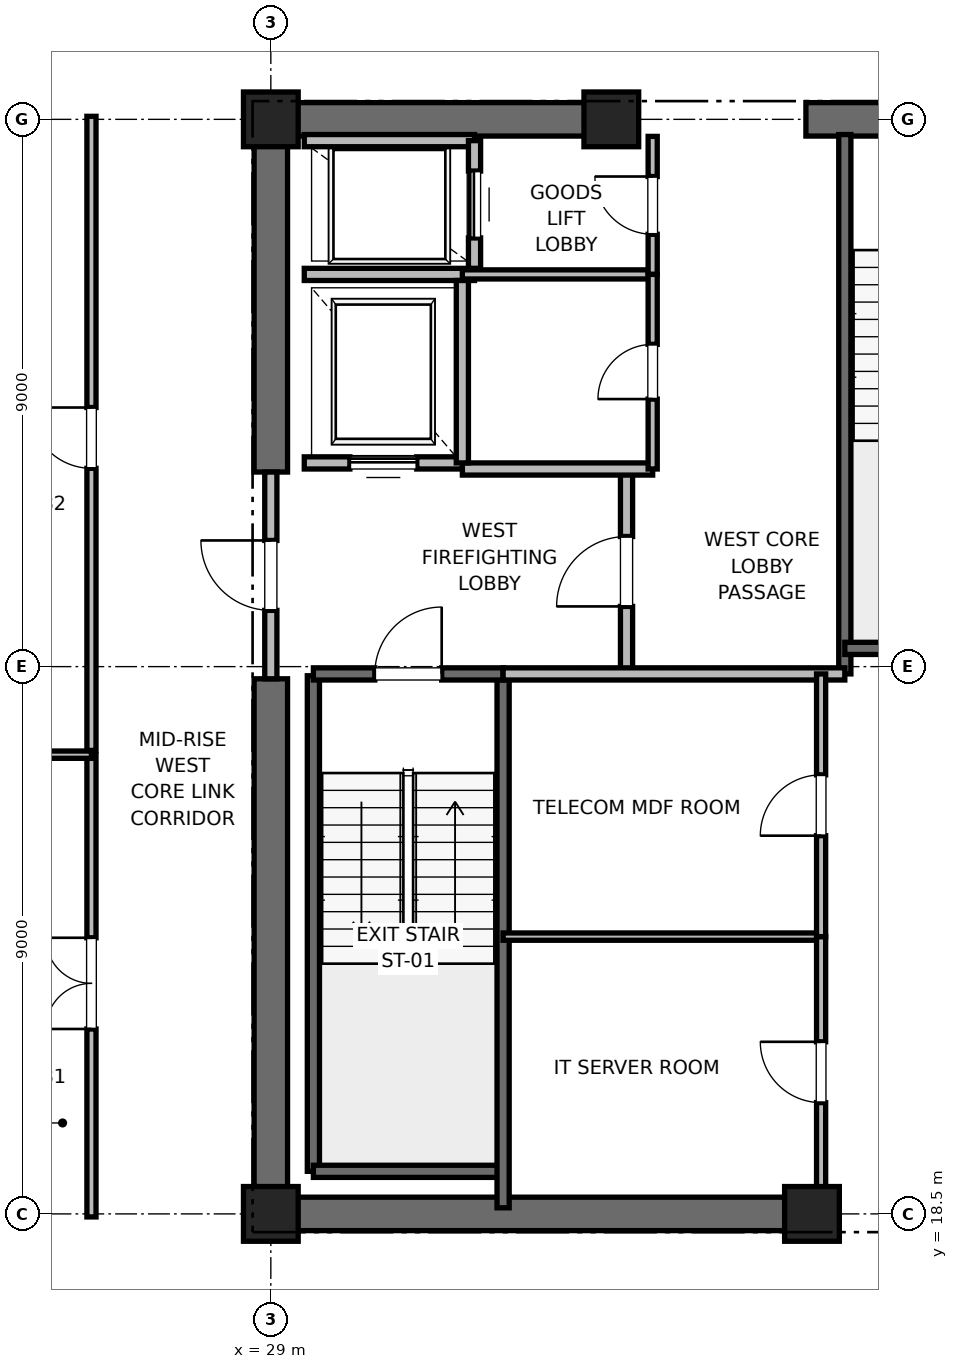
"""IFC4 building model, lengths in metres.
Left out: names, types, materials, properties, quantities, classifications, styles, units other than length and angle.
Written with IfcOpenShell. Run it as: python <this file> out.ifc"""

import sys

from ifc_helpers import new_model, si_unit, direction, frame, frame_2d, origin, origin_2d, place, context, subcontext, project, spatial, rectangle, extrude, element, fill, save


model = new_model("IFC4")
c1 = context("Model", 3, precision=1e-05, world=origin(), true_north=direction((0.0, 1.0)))
c2 = subcontext(c1, "Body", "Model", "MODEL_VIEW")
j1 = project(units=[si_unit("LENGTHUNIT", "METRE"), si_unit("PLANEANGLEUNIT", "RADIAN")], contexts=[c1])
p1 = place(None, origin())
s1 = spatial("IfcSite", under=j1, at=p1, CompositionType="ELEMENT")
p2 = place(p1, origin())
s2 = spatial("IfcBuilding", under=s1, at=p2, CompositionType="ELEMENT")
p3 = place(p2, frame((0.0, 0.0, 217.2)))
s3 = spatial("IfcBuildingStorey", under=s2, at=p3, CompositionType="ELEMENT", Elevation=217.2)
for number, where, z_axis, x_axis in (
    (1, (29.0, 18.5, 0.0), (0.0, 0.0, 1.0), (1.0, 0.0, 0.0)),
    (2, (29.0, 36.5, 0.0), (0.0, 0.0, 1.0), (1.0, 0.0, 0.0)),
    (3, (37.9, 18.5, 0.0), (0.0, 0.0, 1.0), (1.0, 0.0, 0.0)),
    (4, (34.6, 36.5, 0.0), (0.0, 0.0, 1.0), (1.0, 0.0, 0.0)),
):
    element("IfcColumn", number, at=place(p3, frame(where, z_axis=z_axis, x_axis=x_axis)), inside=s3, PredefinedType="PILASTER", context=c2, shape_type="SweptSolid", body=[
        extrude(rectangle(XDim=0.9, YDim=0.9, at=origin_2d()), origin(), (0.0, 0.0, 1.0), 4.0),
    ])
p4 = place(p3, frame((29.0, 18.5, 0.0), z_axis=(0.0, 0.0, 1.0), x_axis=(1.0, 0.0, 0.0)))
e5 = element("IfcWall", 5, at=p4, inside=s3, PredefinedType="SHEAR", context=c2, shape_type="SweptSolid", body=[
    extrude(rectangle(XDim=9.2, YDim=0.55, at=frame_2d((4.6, 0.0))), origin(), (0.0, 0.0, 1.0), 3.775),
])
p5 = place(p3, frame((29.0, 36.5, 0.0), z_axis=(0.0, 0.0, 1.0), x_axis=(1.0, 0.0, 0.0)))
e6 = element("IfcWall", 6, at=p5, inside=s3, PredefinedType="SHEAR", context=c2, shape_type="SweptSolid", body=[
    extrude(rectangle(XDim=5.8, YDim=0.55, at=frame_2d((2.9, 0.0))), origin(), (0.0, 0.0, 1.0), 3.775),
])
p6 = place(p3, frame((37.8, 36.5, 0.0), z_axis=(0.0, 0.0, 1.0), x_axis=(1.0, 0.0, 0.0)))
e7 = element("IfcWall", 7, at=p6, inside=s3, PredefinedType="SHEAR", context=c2, shape_type="SweptSolid", body=[
    extrude(rectangle(XDim=4.4, YDim=0.55, at=frame_2d((2.2, 0.0))), origin(), (0.0, 0.0, 1.0), 3.775),
])
p7 = place(p6, frame((1.65, 0.0, 0.0)))
e8 = element("IfcOpeningElement", 8, at=p7, cuts=e7, PredefinedType="OPENING", context=c2, shape_type="SweptSolid", body=[
    extrude(rectangle(XDim=1.1, YDim=2.15, at=frame_2d((0.55, 1.075))), frame((0.0, 0.275, 0.0), z_axis=(0.0, -1.0, 0.0), x_axis=(1.0, 0.0, 0.0)), (0.0, 0.0, 1.0), 0.55),
])
p8 = place(p3, frame((29.0, 18.5, 0.0), z_axis=(0.0, 0.0, 1.0), x_axis=(0.0, 1.0, 0.0)))
e9 = element("IfcWall", 9, at=p8, inside=s3, PredefinedType="SHEAR", context=c2, shape_type="SweptSolid", body=[
    extrude(rectangle(XDim=8.8, YDim=0.55, at=frame_2d((4.4, 0.0))), origin(), (0.0, 0.0, 1.0), 3.775),
])
p9 = place(p3, frame((29.0, 30.7, 0.0), z_axis=(0.0, 0.0, 1.0), x_axis=(0.0, 1.0, 0.0)))
e10 = element("IfcWall", 10, at=p9, inside=s3, PredefinedType="SHEAR", context=c2, shape_type="SweptSolid", body=[
    extrude(rectangle(XDim=5.8, YDim=0.55, at=frame_2d((2.9, 0.0))), origin(), (0.0, 0.0, 1.0), 3.775),
])
p10 = place(p3, frame((29.7, 19.2, 0.0), z_axis=(0.0, 0.0, 1.0), x_axis=(0.0, 1.0, 0.0)))
e11 = element("IfcWall", 11, at=p10, inside=s3, PredefinedType="SOLIDWALL", context=c2, shape_type="SweptSolid", body=[
    extrude(rectangle(XDim=8.15, YDim=0.2, at=frame_2d((4.075, 0.0))), origin(), (0.0, 0.0, 1.0), 3.775),
])
p11 = place(p3, frame((29.7, 19.2, 0.0), z_axis=(0.0, 0.0, 1.0), x_axis=(1.0, 0.0, 0.0)))
e12 = element("IfcWall", 12, at=p11, inside=s3, PredefinedType="SOLIDWALL", context=c2, shape_type="SweptSolid", body=[
    extrude(rectangle(XDim=3.12, YDim=0.2, at=frame_2d((1.56, 0.0))), origin(), (0.0, 0.0, 1.0), 3.775),
])
p12 = place(p3, frame((32.82, 18.6, 0.0), z_axis=(0.0, 0.0, 1.0), x_axis=(0.0, 1.0, 0.0)))
e13 = element("IfcWall", 13, at=p12, inside=s3, PredefinedType="SOLIDWALL", context=c2, shape_type="SweptSolid", body=[
    extrude(rectangle(XDim=8.78, YDim=0.2, at=frame_2d((4.39, 0.0))), origin(), (0.0, 0.0, 1.0), 3.775),
])
p13 = place(p3, frame((29.7, 27.38, 0.0), z_axis=(0.0, 0.0, 1.0), x_axis=(1.0, 0.0, 0.0)))
e14 = element("IfcWall", 14, at=p13, inside=s3, PredefinedType="SOLIDWALL", context=c2, shape_type="SweptSolid", body=[
    extrude(rectangle(XDim=3.12, YDim=0.2, at=frame_2d((1.56, 0.0))), origin(), (0.0, 0.0, 1.0), 3.775),
])
p14 = place(p13, frame((1.01, 0.0, 0.0)))
e15 = element("IfcOpeningElement", 15, at=p14, cuts=e14, PredefinedType="OPENING", context=c2, shape_type="SweptSolid", body=[
    extrude(rectangle(XDim=1.1, YDim=2.15, at=frame_2d((0.55, 1.075))), frame((0.0, 0.1, 0.0), z_axis=(0.0, -1.0, 0.0), x_axis=(1.0, 0.0, 0.0)), (0.0, 0.0, 1.0), 0.2),
])
p15 = place(p3, frame((38.44, 27.38, 0.0), z_axis=(0.0, 0.0, 1.0), x_axis=(0.0, 1.0, 0.0)))
e16 = element("IfcWall", 16, at=p15, inside=s3, PredefinedType="SOLIDWALL", context=c2, shape_type="SweptSolid", body=[
    extrude(rectangle(XDim=8.87, YDim=0.2, at=frame_2d((4.435, 0.0))), origin(), (0.0, 0.0, 1.0), 3.775),
])
p16 = place(p3, frame((38.44, 27.8, 0.0), z_axis=(0.0, 0.0, 1.0), x_axis=(1.0, 0.0, 0.0)))
e17 = element("IfcWall", 17, at=p16, inside=s3, PredefinedType="SOLIDWALL", context=c2, shape_type="SweptSolid", body=[
    extrude(rectangle(XDim=3.32, YDim=0.2, at=frame_2d((1.66, 0.0))), origin(), (0.0, 0.0, 1.0), 3.775),
])
p17 = place(p3, frame((34.85, 27.38, 0.0), z_axis=(0.0, 0.0, 1.0), x_axis=(0.0, 1.0, 0.0)))
e18 = element("IfcWall", 18, at=p17, inside=s3, PredefinedType="PARTITIONING", context=c2, shape_type="SweptSolid", body=[
    extrude(rectangle(XDim=3.37, YDim=0.2, at=frame_2d((1.685, 0.0))), origin(), (0.0, 0.0, 1.0), 3.775),
])
p18 = place(p17, frame((1.11, 0.0, 0.0)))
e19 = element("IfcOpeningElement", 19, at=p18, cuts=e18, PredefinedType="OPENING", context=c2, shape_type="SweptSolid", body=[
    extrude(rectangle(XDim=1.15, YDim=2.2, at=frame_2d((0.575, 1.1))), frame((0.0, 0.1, 0.0), z_axis=(0.0, -1.0, 0.0), x_axis=(1.0, 0.0, 0.0)), (0.0, 0.0, 1.0), 0.2),
])
p19 = place(p3, frame((29.0, 27.3, 0.0), z_axis=(0.0, 0.0, 1.0), x_axis=(0.0, 1.0, 0.0)))
e20 = element("IfcWall", 20, at=p19, inside=s3, PredefinedType="PARTITIONING", context=c2, shape_type="SweptSolid", body=[
    extrude(rectangle(XDim=3.4, YDim=0.2, at=frame_2d((1.7, 0.0))), origin(), (0.0, 0.0, 1.0), 2.755),
])
p20 = place(p19, frame((1.125, 0.0, 0.0)))
e21 = element("IfcOpeningElement", 21, at=p20, cuts=e20, PredefinedType="OPENING", context=c2, shape_type="SweptSolid", body=[
    extrude(rectangle(XDim=1.15, YDim=2.2, at=frame_2d((0.575, 1.1))), frame((0.0, 0.1, 0.0), z_axis=(0.0, -1.0, 0.0), x_axis=(1.0, 0.0, 0.0)), (0.0, 0.0, 1.0), 0.2),
])
p21 = place(p3, frame((32.82, 27.38, 0.0), z_axis=(0.0, 0.0, 1.0), x_axis=(1.0, 0.0, 0.0)))
e22 = element("IfcWall", 22, at=p21, inside=s3, PredefinedType="PARTITIONING", context=c2, shape_type="SweptSolid", body=[
    extrude(rectangle(XDim=5.62, YDim=0.2, at=frame_2d((2.81, 0.0))), origin(), (0.0, 0.0, 1.0), 3.775),
])
p22 = place(p3, frame((32.15, 30.75, 0.0), z_axis=(0.0, 0.0, 1.0), x_axis=(1.0, 0.0, 0.0)))
e23 = element("IfcWall", 23, at=p22, inside=s3, PredefinedType="PARTITIONING", context=c2, shape_type="SweptSolid", body=[
    extrude(rectangle(XDim=3.13, YDim=0.2, at=frame_2d((1.565, 0.0))), origin(), (0.0, 0.0, 1.0), 3.775),
])
p23 = place(p3, frame((29.55, 30.85, 0.0), z_axis=(0.0, 0.0, 1.0), x_axis=(1.0, 0.0, 0.0)))
e24 = element("IfcWall", 24, at=p23, inside=s3, PredefinedType="SOLIDWALL", context=c2, shape_type="SweptSolid", body=[
    extrude(rectangle(XDim=2.6, YDim=0.2, at=frame_2d((1.3, 0.0))), origin(), (0.0, 0.0, 1.0), 2.755),
])
p24 = place(p23, frame((0.75, 0.0, 0.0)))
e25 = element("IfcOpeningElement", 25, at=p24, cuts=e24, PredefinedType="OPENING", context=c2, shape_type="SweptSolid", body=[
    extrude(rectangle(XDim=1.1, YDim=2.2, at=frame_2d((0.55, 1.1))), frame((0.0, 0.1, 0.0), z_axis=(0.0, -1.0, 0.0), x_axis=(1.0, 0.0, 0.0)), (0.0, 0.0, 1.0), 0.2),
])
p25 = place(p3, frame((29.55, 33.95, 0.0), z_axis=(0.0, 0.0, 1.0), x_axis=(1.0, 0.0, 0.0)))
e26 = element("IfcWall", 26, at=p25, inside=s3, PredefinedType="SOLIDWALL", context=c2, shape_type="SweptSolid", body=[
    extrude(rectangle(XDim=2.8, YDim=0.2, at=frame_2d((1.4, 0.0))), origin(), (0.0, 0.0, 1.0), 3.775),
])
p26 = place(p3, frame((32.15, 30.85, 0.0), z_axis=(0.0, 0.0, 1.0), x_axis=(0.0, 1.0, 0.0)))
e27 = element("IfcWall", 27, at=p26, inside=s3, PredefinedType="SOLIDWALL", context=c2, shape_type="SweptSolid", body=[
    extrude(rectangle(XDim=3.0, YDim=0.2, at=frame_2d((1.5, 0.0))), origin(), (0.0, 0.0, 1.0), 3.775),
])
p27 = place(p3, frame((32.35, 36.15, 0.0), z_axis=(0.0, 0.0, 1.0), x_axis=(-1.0, 0.0, 0.0)))
e28 = element("IfcWall", 28, at=p27, inside=s3, PredefinedType="SOLIDWALL", context=c2, shape_type="SweptSolid", body=[
    extrude(rectangle(XDim=2.8, YDim=0.2, at=frame_2d((1.4, 0.0))), origin(), (0.0, 0.0, 1.0), 3.062),
])
p28 = place(p3, frame((32.35, 34.05, 0.0), z_axis=(0.0, 0.0, 1.0), x_axis=(0.0, 1.0, 0.0)))
e29 = element("IfcWall", 29, at=p28, inside=s3, PredefinedType="SOLIDWALL", context=c2, shape_type="SweptSolid", body=[
    extrude(rectangle(XDim=2.1, YDim=0.2, at=frame_2d((1.05, 0.0))), origin(), (0.0, 0.0, 1.0), 3.775),
])
p29 = place(p28, frame((0.5, 0.0, 0.0)))
e30 = element("IfcOpeningElement", 30, at=p29, cuts=e29, PredefinedType="OPENING", context=c2, shape_type="SweptSolid", body=[
    extrude(rectangle(XDim=1.1, YDim=2.2, at=frame_2d((0.55, 1.1))), frame((0.0, 0.1, 0.0), z_axis=(0.0, -1.0, 0.0), x_axis=(1.0, 0.0, 0.0)), (0.0, 0.0, 1.0), 0.2),
])
p30 = place(p3, frame((32.15, 33.95, 0.0), z_axis=(0.0, 0.0, 1.0), x_axis=(1.0, 0.0, 0.0)))
e31 = element("IfcWall", 31, at=p30, inside=s3, PredefinedType="PARTITIONING", context=c2, shape_type="SweptSolid", body=[
    extrude(rectangle(XDim=3.13, YDim=0.15, at=frame_2d((1.565, 0.0))), origin(), (0.0, 0.0, 1.0), 2.85),
])
p31 = place(p3, frame((35.28, 33.95, 0.0), z_axis=(0.0, 0.0, 1.0), x_axis=(0.0, 1.0, 0.0)))
e32 = element("IfcWall", 32, at=p31, inside=s3, PredefinedType="PARTITIONING", context=c2, shape_type="SweptSolid", body=[
    extrude(rectangle(XDim=2.27, YDim=0.15, at=frame_2d((1.135, 0.0))), origin(), (0.0, 0.0, 1.0), 2.755),
])
p32 = place(p31, frame((0.66, 0.0, 0.0)))
e33 = element("IfcOpeningElement", 33, at=p32, cuts=e32, PredefinedType="OPENING", context=c2, shape_type="SweptSolid", body=[
    extrude(rectangle(XDim=0.95, YDim=2.15, at=frame_2d((0.475, 1.075))), frame((0.0, 0.075, 0.0), z_axis=(0.0, -1.0, 0.0), x_axis=(1.0, 0.0, 0.0)), (0.0, 0.0, 1.0), 0.15),
])
p33 = place(p3, frame((35.28, 30.75, 0.0), z_axis=(0.0, 0.0, 1.0), x_axis=(0.0, 1.0, 0.0)))
e34 = element("IfcWall", 34, at=p33, inside=s3, PredefinedType="PARTITIONING", context=c2, shape_type="SweptSolid", body=[
    extrude(rectangle(XDim=3.2, YDim=0.15, at=frame_2d((1.6, 0.0))), origin(), (0.0, 0.0, 1.0), 2.85),
])
p34 = place(p33, frame((1.15, 0.0, 0.0)))
e35 = element("IfcOpeningElement", 35, at=p34, cuts=e34, PredefinedType="OPENING", context=c2, shape_type="SweptSolid", body=[
    extrude(rectangle(XDim=0.9, YDim=2.1, at=frame_2d((0.45, 1.05))), frame((0.0, 0.075, 0.0), z_axis=(0.0, -1.0, 0.0), x_axis=(1.0, 0.0, 0.0)), (0.0, 0.0, 1.0), 0.15),
])
p35 = place(p3, frame((32.82, 23.06, 0.0), z_axis=(0.0, 0.0, 1.0), x_axis=(1.0, 0.0, 0.0)))
e36 = element("IfcWall", 36, at=p35, inside=s3, PredefinedType="PARTITIONING", context=c2, shape_type="SweptSolid", body=[
    extrude(rectangle(XDim=5.23, YDim=0.12, at=frame_2d((2.615, 0.0))), origin(), (0.0, 0.0, 1.0), 2.85),
])
p36 = place(p3, frame((38.05, 18.6, 0.0), z_axis=(0.0, 0.0, 1.0), x_axis=(0.0, 1.0, 0.0)))
e37 = element("IfcWall", 37, at=p36, inside=s3, PredefinedType="PARTITIONING", context=c2, shape_type="SweptSolid", body=[
    extrude(rectangle(XDim=4.46, YDim=0.15, at=frame_2d((2.23, 0.0))), origin(), (0.0, 0.0, 1.0), 2.755),
])
p37 = place(p36, frame((1.73, 0.0, 0.0)))
e38 = element("IfcOpeningElement", 38, at=p37, cuts=e37, PredefinedType="OPENING", context=c2, shape_type="SweptSolid", body=[
    extrude(rectangle(XDim=1.0, YDim=2.15, at=frame_2d((0.5, 1.075))), frame((0.0, 0.075, 0.0), z_axis=(0.0, -1.0, 0.0), x_axis=(1.0, 0.0, 0.0)), (0.0, 0.0, 1.0), 0.15),
])
p38 = place(p3, frame((38.05, 23.06, 0.0), z_axis=(0.0, 0.0, 1.0), x_axis=(0.0, 1.0, 0.0)))
e39 = element("IfcWall", 39, at=p38, inside=s3, PredefinedType="PARTITIONING", context=c2, shape_type="SweptSolid", body=[
    extrude(rectangle(XDim=4.32, YDim=0.15, at=frame_2d((2.16, 0.0))), origin(), (0.0, 0.0, 1.0), 2.85),
])
p39 = place(p38, frame((1.66, 0.0, 0.0)))
e40 = element("IfcOpeningElement", 40, at=p39, cuts=e39, PredefinedType="OPENING", context=c2, shape_type="SweptSolid", body=[
    extrude(rectangle(XDim=1.0, YDim=2.15, at=frame_2d((0.5, 1.075))), frame((0.0, 0.075, 0.0), z_axis=(0.0, -1.0, 0.0), x_axis=(1.0, 0.0, 0.0)), (0.0, 0.0, 1.0), 0.15),
])
p40 = place(p3, frame((26.05, 18.45, 0.0), z_axis=(0.0, 0.0, 1.0), x_axis=(0.0, 1.0, 0.0)))
e41 = element("IfcWall", 41, at=p40, inside=s3, PredefinedType="PARTITIONING", context=c2, shape_type="SweptSolid", body=[
    extrude(rectangle(XDim=7.602, YDim=0.15, at=frame_2d((3.801, 0.0))), origin(), (0.0, 0.0, 1.0), 2.85),
])
p41 = place(p40, frame((3.091, 0.0, 0.0)))
e42 = element("IfcOpeningElement", 42, at=p41, cuts=e41, PredefinedType="OPENING", context=c2, shape_type="SweptSolid", body=[
    extrude(rectangle(XDim=1.5, YDim=2.25, at=frame_2d((0.75, 1.125))), frame((0.0, 0.075, 0.0), z_axis=(0.0, -1.0, 0.0), x_axis=(1.0, 0.0, 0.0)), (0.0, 0.0, 1.0), 0.15),
])
p42 = place(p3, frame((14.663, 26.052, 0.0), z_axis=(0.0, 0.0, 1.0), x_axis=(1.0, 0.0, 0.0)))
e43 = element("IfcWall", 43, at=p42, inside=s3, PredefinedType="PARTITIONING", context=c2, shape_type="SweptSolid", body=[
    extrude(rectangle(XDim=11.387, YDim=0.12, at=frame_2d((5.694, 0.0))), origin(), (0.0, 0.0, 1.0), 2.85),
])
p43 = place(p3, frame((26.05, 26.122, 0.0), z_axis=(0.0, 0.0, 1.0), x_axis=(0.0, 1.0, 0.0)))
e44 = element("IfcWall", 44, at=p43, inside=s3, PredefinedType="PARTITIONING", context=c2, shape_type="SweptSolid", body=[
    extrude(rectangle(XDim=10.428, YDim=0.15, at=frame_2d((5.214, 0.0))), origin(), (0.0, 0.0, 1.0), 2.85),
])
p44 = place(p43, frame((4.639, 0.0, 0.0)))
e45 = element("IfcOpeningElement", 45, at=p44, cuts=e44, PredefinedType="OPENING", context=c2, shape_type="SweptSolid", body=[
    extrude(rectangle(XDim=1.0, YDim=2.15, at=frame_2d((0.5, 1.075))), frame((0.0, 0.075, 0.0), z_axis=(0.0, -1.0, 0.0), x_axis=(1.0, 0.0, 0.0)), (0.0, 0.0, 1.0), 0.15),
])
p45 = place(p14, origin())
e46 = element("IfcDoor", 46, at=p45, inside=s3, OperationType="SINGLE_SWING_RIGHT", PredefinedType="DOOR", context=c2, shape_type="SweptSolid", body=[
    extrude(rectangle(XDim=1.1, YDim=2.15, at=frame_2d((0.55, 1.075))), frame((0.0, 0.025, 0.0), z_axis=(0.0, -1.0, 0.0), x_axis=(1.0, 0.0, 0.0)), (0.0, 0.0, 1.0), 0.05),
])
fill(e15, e46)
p46 = place(p18, origin())
e47 = element("IfcDoor", 47, at=p46, inside=s3, OperationType="SINGLE_SWING_LEFT", PredefinedType="DOOR", context=c2, shape_type="SweptSolid", body=[
    extrude(rectangle(XDim=1.15, YDim=2.2, at=frame_2d((0.575, 1.1))), frame((0.0, 0.025, 0.0), z_axis=(0.0, -1.0, 0.0), x_axis=(1.0, 0.0, 0.0)), (0.0, 0.0, 1.0), 0.05),
])
fill(e19, e47)
p47 = place(p20, origin())
e48 = element("IfcDoor", 48, at=p47, inside=s3, OperationType="SINGLE_SWING_RIGHT", PredefinedType="DOOR", context=c2, shape_type="SweptSolid", body=[
    extrude(rectangle(XDim=1.15, YDim=2.2, at=frame_2d((0.575, 1.1))), frame((0.0, 0.025, 0.0), z_axis=(0.0, -1.0, 0.0), x_axis=(1.0, 0.0, 0.0)), (0.0, 0.0, 1.0), 0.05),
])
fill(e21, e48)
p48 = place(p24, origin())
e49 = element("IfcDoor", 49, at=p48, inside=s3, OperationType="SLIDING_TO_RIGHT", PredefinedType="DOOR", context=c2, shape_type="SweptSolid", body=[
    extrude(rectangle(XDim=1.1, YDim=2.2, at=frame_2d((0.55, 1.1))), frame((0.0, 0.025, 0.0), z_axis=(0.0, -1.0, 0.0), x_axis=(1.0, 0.0, 0.0)), (0.0, 0.0, 1.0), 0.05),
])
fill(e25, e49)
p49 = place(p29, origin())
e50 = element("IfcDoor", 50, at=p49, inside=s3, OperationType="SLIDING_TO_RIGHT", PredefinedType="DOOR", context=c2, shape_type="SweptSolid", body=[
    extrude(rectangle(XDim=1.1, YDim=2.2, at=frame_2d((0.55, 1.1))), frame((0.0, 0.025, 0.0), z_axis=(0.0, -1.0, 0.0), x_axis=(1.0, 0.0, 0.0)), (0.0, 0.0, 1.0), 0.05),
])
fill(e30, e50)
p50 = place(p32, origin())
e51 = element("IfcDoor", 51, at=p50, inside=s3, OperationType="SINGLE_SWING_RIGHT", PredefinedType="DOOR", context=c2, shape_type="SweptSolid", body=[
    extrude(rectangle(XDim=0.95, YDim=2.15, at=frame_2d((0.475, 1.075))), frame((0.0, 0.025, 0.0), z_axis=(0.0, -1.0, 0.0), x_axis=(1.0, 0.0, 0.0)), (0.0, 0.0, 1.0), 0.05),
])
fill(e33, e51)
p51 = place(p34, origin())
e52 = element("IfcDoor", 52, at=p51, inside=s3, OperationType="SINGLE_SWING_LEFT", PredefinedType="DOOR", context=c2, shape_type="SweptSolid", body=[
    extrude(rectangle(XDim=0.9, YDim=2.1, at=frame_2d((0.45, 1.05))), frame((0.0, 0.025, 0.0), z_axis=(0.0, -1.0, 0.0), x_axis=(1.0, 0.0, 0.0)), (0.0, 0.0, 1.0), 0.05),
])
fill(e35, e52)
p52 = place(p37, origin())
e53 = element("IfcDoor", 53, at=p52, inside=s3, OperationType="SINGLE_SWING_RIGHT", PredefinedType="DOOR", context=c2, shape_type="SweptSolid", body=[
    extrude(rectangle(XDim=1.0, YDim=2.15, at=frame_2d((0.5, 1.075))), frame((0.0, 0.025, 0.0), z_axis=(0.0, -1.0, 0.0), x_axis=(1.0, 0.0, 0.0)), (0.0, 0.0, 1.0), 0.05),
])
fill(e38, e53)
p53 = place(p39, origin())
e54 = element("IfcDoor", 54, at=p53, inside=s3, OperationType="SINGLE_SWING_LEFT", PredefinedType="DOOR", context=c2, shape_type="SweptSolid", body=[
    extrude(rectangle(XDim=1.0, YDim=2.15, at=frame_2d((0.5, 1.075))), frame((0.0, 0.025, 0.0), z_axis=(0.0, -1.0, 0.0), x_axis=(1.0, 0.0, 0.0)), (0.0, 0.0, 1.0), 0.05),
])
fill(e40, e54)
p54 = place(p41, origin())
e55 = element("IfcDoor", 55, at=p54, inside=s3, OperationType="DOUBLE_DOOR_SINGLE_SWING", PredefinedType="DOOR", context=c2, shape_type="SweptSolid", body=[
    extrude(rectangle(XDim=1.5, YDim=2.25, at=frame_2d((0.75, 1.125))), frame((0.0, 0.025, 0.0), z_axis=(0.0, -1.0, 0.0), x_axis=(1.0, 0.0, 0.0)), (0.0, 0.0, 1.0), 0.05),
])
fill(e42, e55)
p55 = place(p44, origin())
e56 = element("IfcDoor", 56, at=p55, inside=s3, OperationType="SINGLE_SWING_RIGHT", PredefinedType="DOOR", context=c2, shape_type="SweptSolid", body=[
    extrude(rectangle(XDim=1.0, YDim=2.15, at=frame_2d((0.5, 1.075))), frame((0.0, 0.025, 0.0), z_axis=(0.0, -1.0, 0.0), x_axis=(1.0, 0.0, 0.0)), (0.0, 0.0, 1.0), 0.05),
])
fill(e45, e56)
save(model, sys.argv[1])
